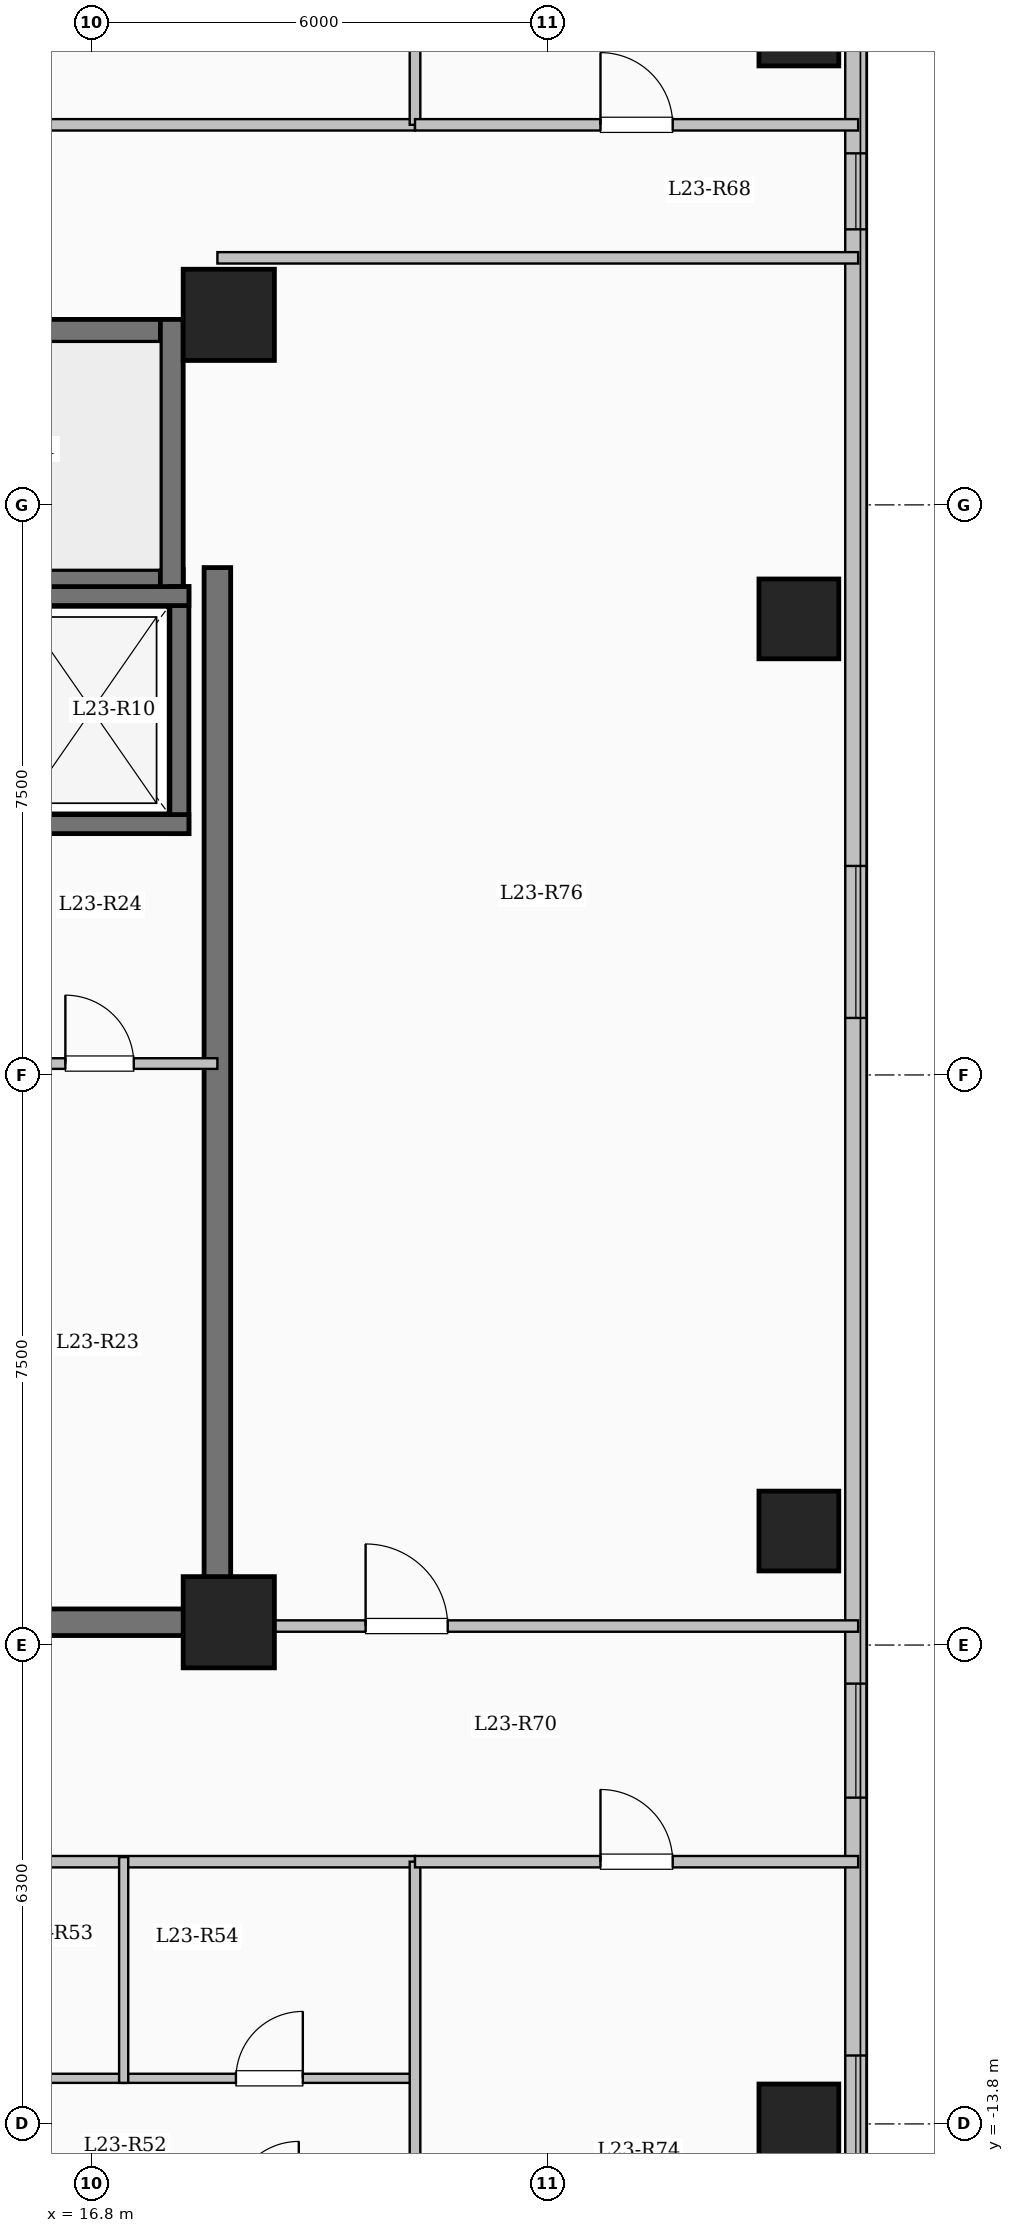
"""IFC4 building model, lengths in metres.
Left out: names, types, materials, properties, quantities, classifications, styles, units other than length and angle.
Written with IfcOpenShell. Run it as: python <this file> out.ifc"""

import sys

from ifc_helpers import new_model, si_unit, direction, frame, frame_2d, origin, origin_2d, place, context, subcontext, project, spatial, rectangle, extrude, element, fill, save


model = new_model("IFC4")
c1 = context("Model", 3, precision=1e-05, world=origin(), true_north=direction((0.0, 1.0)))
c2 = subcontext(c1, "Body", "Model", "MODEL_VIEW")
j1 = project(units=[si_unit("LENGTHUNIT", "METRE"), si_unit("PLANEANGLEUNIT", "RADIAN")], contexts=[c1])
p1 = place(None, origin())
s1 = spatial("IfcSite", under=j1, at=p1, CompositionType="ELEMENT")
p2 = place(p1, origin())
s2 = spatial("IfcBuilding", under=s1, at=p2, CompositionType="ELEMENT")
p3 = place(p2, frame((0.0, 0.0, 88.35)))
s3 = spatial("IfcBuildingStorey", under=s2, at=p3, CompositionType="ELEMENT", Elevation=88.35)
for number, where, z_axis, x_axis in (
    (1, (18.6, -7.2, 0.0), (0.0, 0.0, 1.0), (1.0, 0.0, 0.0)),
    (2, (18.6, 10.0, 0.0), (0.0, 0.0, 1.0), (1.0, 0.0, 0.0)),
):
    element("IfcColumn", number, at=place(p3, frame(where, z_axis=z_axis, x_axis=x_axis)), inside=s3, PredefinedType="COLUMN", context=c2, shape_type="SweptSolid", body=[
        extrude(rectangle(XDim=1.2, YDim=1.2, at=origin_2d()), origin(), (0.0, 0.0, 1.0), 3.35),
    ])
for number, where, z_axis, x_axis in (
    (3, (26.1, -13.8, 0.0), (0.0, 0.0, 1.0), (1.0, 0.0, 0.0)),
    (4, (26.1, -6.0, 0.0), (0.0, 0.0, 1.0), (1.0, 0.0, 0.0)),
    (5, (26.1, 6.0, 0.0), (0.0, 0.0, 1.0), (1.0, 0.0, 0.0)),
    (6, (26.1, 13.8, 0.0), (0.0, 0.0, 1.0), (1.0, 0.0, 0.0)),
):
    element("IfcColumn", number, at=place(p3, frame(where, z_axis=z_axis, x_axis=x_axis)), inside=s3, PredefinedType="COLUMN", context=c2, shape_type="SweptSolid", body=[
        extrude(rectangle(XDim=1.05, YDim=1.05, at=origin_2d()), origin(), (0.0, 0.0, 1.0), 3.35),
    ])
p4 = place(p3, frame((26.85, 17.85, 0.0), z_axis=(0.0, 0.0, 1.0), x_axis=(0.0, -1.0, 0.0)))
e7 = element("IfcWall", 7, at=p4, inside=s3, PredefinedType="SOLIDWALL", context=c2, shape_type="SweptSolid", body=[
    extrude(rectangle(XDim=35.7, YDim=0.28, at=frame_2d((17.85, 0.0))), origin(), (0.0, 0.0, 1.0), 3.1),
])
p5 = place(p4, frame((1.675, 0.0, 0.9)))
e8 = element("IfcOpeningElement", 8, at=p5, cuts=e7, PredefinedType="OPENING", context=c2, shape_type="SweptSolid", body=[
    extrude(rectangle(XDim=2.0, YDim=1.7, at=frame_2d((1.0, 0.85))), frame((0.0, 0.15, 0.0), z_axis=(0.0, -1.0, 0.0), x_axis=(1.0, 0.0, 0.0)), (0.0, 0.0, 1.0), 0.3),
])
p6 = place(p4, frame((5.725, 0.0, 0.95)))
e9 = element("IfcOpeningElement", 9, at=p6, cuts=e7, PredefinedType="OPENING", context=c2, shape_type="SweptSolid", body=[
    extrude(rectangle(XDim=1.0, YDim=1.5, at=frame_2d((0.5, 0.75))), frame((0.0, 0.15, 0.0), z_axis=(0.0, -1.0, 0.0), x_axis=(1.0, 0.0, 0.0)), (0.0, 0.0, 1.0), 0.3),
])
p7 = place(p4, frame((15.1, 0.0, 0.9)))
e10 = element("IfcOpeningElement", 10, at=p7, cuts=e7, PredefinedType="OPENING", context=c2, shape_type="SweptSolid", body=[
    extrude(rectangle(XDim=2.0, YDim=1.7, at=frame_2d((1.0, 0.85))), frame((0.0, 0.15, 0.0), z_axis=(0.0, -1.0, 0.0), x_axis=(1.0, 0.0, 0.0)), (0.0, 0.0, 1.0), 0.3),
])
p8 = place(p4, frame((25.857, 0.0, 0.9)))
e11 = element("IfcOpeningElement", 11, at=p8, cuts=e7, PredefinedType="OPENING", context=c2, shape_type="SweptSolid", body=[
    extrude(rectangle(XDim=1.5, YDim=1.65, at=frame_2d((0.75, 0.825))), frame((0.0, 0.15, 0.0), z_axis=(0.0, -1.0, 0.0), x_axis=(1.0, 0.0, 0.0)), (0.0, 0.0, 1.0), 0.3),
])
p9 = place(p4, frame((30.75, 0.0, 0.9)))
e12 = element("IfcOpeningElement", 12, at=p9, cuts=e7, PredefinedType="OPENING", context=c2, shape_type="SweptSolid", body=[
    extrude(rectangle(XDim=2.4, YDim=1.8, at=frame_2d((1.2, 0.9))), frame((0.0, 0.15, 0.0), z_axis=(0.0, -1.0, 0.0), x_axis=(1.0, 0.0, 0.0)), (0.0, 0.0, 1.0), 0.3),
])
p10 = place(p3, frame((10.0, 9.79, 0.0), z_axis=(0.0, 0.0, 1.0), x_axis=(1.0, 0.0, 0.0)))
e13 = element("IfcWall", 13, at=p10, inside=s3, PredefinedType="SHEAR", context=c2, shape_type="SweptSolid", body=[
    extrude(rectangle(XDim=8.0, YDim=0.3, at=frame_2d((4.0, 0.0))), origin(), (0.0, 0.0, 1.0), 3.35),
])
p11 = place(p3, frame((10.0, 6.5, 0.0), z_axis=(0.0, 0.0, 1.0), x_axis=(1.0, 0.0, 0.0)))
e14 = element("IfcWall", 14, at=p11, inside=s3, PredefinedType="SHEAR", context=c2, shape_type="SweptSolid", body=[
    extrude(rectangle(XDim=8.0, YDim=0.3, at=frame_2d((4.0, 0.0))), origin(), (0.0, 0.0, 1.0), 3.35),
])
p12 = place(p11, frame((0.55, 0.0, 0.0)))
e15 = element("IfcOpeningElement", 15, at=p12, cuts=e14, PredefinedType="OPENING", context=c2, shape_type="SweptSolid", body=[
    extrude(rectangle(XDim=1.0, YDim=2.15, at=frame_2d((0.5, 1.075))), frame((0.0, 0.16, 0.0), z_axis=(0.0, -1.0, 0.0), x_axis=(1.0, 0.0, 0.0)), (0.0, 0.0, 1.0), 0.32),
])
p13 = place(p3, frame((17.85, 6.35, 0.0), z_axis=(0.0, 0.0, 1.0), x_axis=(0.0, 1.0, 0.0)))
e16 = element("IfcWall", 16, at=p13, inside=s3, PredefinedType="SHEAR", context=c2, shape_type="SweptSolid", body=[
    extrude(rectangle(XDim=3.59, YDim=0.3, at=frame_2d((1.795, 0.0))), origin(), (0.0, 0.0, 1.0), 3.35),
])
p14 = place(p3, frame((17.95, 3.175, 0.0), z_axis=(0.0, 0.0, 1.0), x_axis=(0.0, 1.0, 0.0)))
e17 = element("IfcWall", 17, at=p14, inside=s3, PredefinedType="SHEAR", context=c2, shape_type="SweptSolid", body=[
    extrude(rectangle(XDim=3.25, YDim=0.25, at=frame_2d((1.625, 0.0))), origin(), (0.0, 0.0, 1.0), 3.35),
])
for number, where, z_axis, x_axis in (
    (18, (15.525, 3.3, 0.0), (0.0, 0.0, 1.0), (1.0, 0.0, 0.0)),
    (19, (15.525, 6.3, 0.0), (0.0, 0.0, 1.0), (1.0, 0.0, 0.0)),
):
    element("IfcWall", number, at=place(p3, frame(where, z_axis=z_axis, x_axis=x_axis)), inside=s3, PredefinedType="SHEAR", context=c2, shape_type="SweptSolid", body=[
        extrude(rectangle(XDim=2.55, YDim=0.25, at=frame_2d((1.275, 0.0))), origin(), (0.0, 0.0, 1.0), 3.35),
    ])
p15 = place(p3, frame((18.45, -7.375, 0.0), z_axis=(0.0, 0.0, 1.0), x_axis=(0.0, 1.0, 0.0)))
e20 = element("IfcWall", 20, at=p15, inside=s3, PredefinedType="SHEAR", context=c2, shape_type="SweptSolid", body=[
    extrude(rectangle(XDim=14.05, YDim=0.35, at=frame_2d((7.025, 0.0))), origin(), (0.0, 0.0, 1.0), 3.35),
])
p16 = place(p3, frame((10.075, -7.2, 0.0), z_axis=(0.0, 0.0, 1.0), x_axis=(1.0, 0.0, 0.0)))
e21 = element("IfcWall", 21, at=p16, inside=s3, PredefinedType="SHEAR", context=c2, shape_type="SweptSolid", body=[
    extrude(rectangle(XDim=8.55, YDim=0.35, at=frame_2d((4.275, 0.0))), origin(), (0.0, 0.0, 1.0), 3.35),
])
p17 = place(p3, frame((15.4, 0.15, 0.0), z_axis=(0.0, 0.0, 1.0), x_axis=(1.0, 0.0, 0.0)))
e22 = element("IfcWall", 22, at=p17, inside=s3, PredefinedType="PARTITIONING", context=c2, shape_type="SweptSolid", body=[
    extrude(rectangle(XDim=3.05, YDim=0.14, at=frame_2d((1.525, 0.0))), origin(), (0.0, 0.0, 1.0), 3.1),
])
p18 = place(p17, frame((1.05, 0.0, 0.0)))
e23 = element("IfcOpeningElement", 23, at=p18, cuts=e22, PredefinedType="OPENING", context=c2, shape_type="SweptSolid", body=[
    extrude(rectangle(XDim=0.9, YDim=2.08, at=frame_2d((0.45, 1.04))), frame((0.0, 0.08, 0.0), z_axis=(0.0, -1.0, 0.0), x_axis=(1.0, 0.0, 0.0)), (0.0, 0.0, 1.0), 0.16),
])
p19 = place(p3, frame((3.85, 12.5, 0.0), z_axis=(0.0, 0.0, 1.0), x_axis=(1.0, 0.0, 0.0)))
e24 = element("IfcWall", 24, at=p19, inside=s3, PredefinedType="PARTITIONING", context=c2, shape_type="SweptSolid", body=[
    extrude(rectangle(XDim=17.2, YDim=0.15, at=frame_2d((8.6, 0.0))), origin(), (0.0, 0.0, 1.0), 3.1),
])
p20 = place(p19, frame((0.7, 0.0, 0.0)))
e25 = element("IfcOpeningElement", 25, at=p20, cuts=e24, PredefinedType="OPENING", context=c2, shape_type="SweptSolid", body=[
    extrude(rectangle(XDim=0.96, YDim=2.15, at=frame_2d((0.48, 1.075))), frame((0.0, 0.085, 0.0), z_axis=(0.0, -1.0, 0.0), x_axis=(1.0, 0.0, 0.0)), (0.0, 0.0, 1.0), 0.17),
])
p21 = place(p3, frame((8.55, -10.35, 0.0), z_axis=(0.0, 0.0, 1.0), x_axis=(1.0, 0.0, 0.0)))
e26 = element("IfcWall", 26, at=p21, inside=s3, PredefinedType="PARTITIONING", context=c2, shape_type="SweptSolid", body=[
    extrude(rectangle(XDim=12.5, YDim=0.15, at=frame_2d((6.25, 0.0))), origin(), (0.0, 0.0, 1.0), 3.1),
])
p22 = place(p21, frame((0.75, 0.0, 0.0)))
e27 = element("IfcOpeningElement", 27, at=p22, cuts=e26, PredefinedType="OPENING", context=c2, shape_type="SweptSolid", body=[
    extrude(rectangle(XDim=0.96, YDim=2.15, at=frame_2d((0.48, 1.075))), frame((0.0, 0.085, 0.0), z_axis=(0.0, -1.0, 0.0), x_axis=(1.0, 0.0, 0.0)), (0.0, 0.0, 1.0), 0.17),
])
p23 = place(p3, frame((13.592, -13.2, 0.0), z_axis=(0.0, 0.0, 1.0), x_axis=(1.0, 0.0, 0.0)))
e28 = element("IfcWall", 28, at=p23, inside=s3, PredefinedType="PARTITIONING", context=c2, shape_type="SweptSolid", body=[
    extrude(rectangle(XDim=3.625, YDim=0.12, at=frame_2d((1.812, 0.0))), origin(), (0.0, 0.0, 1.0), 3.1),
])
p24 = place(p23, frame((1.372, 0.0, 0.0)))
e29 = element("IfcOpeningElement", 29, at=p24, cuts=e28, PredefinedType="OPENING", context=c2, shape_type="SweptSolid", body=[
    extrude(rectangle(XDim=0.88, YDim=2.1, at=frame_2d((0.44, 1.05))), frame((0.0, 0.07, 0.0), z_axis=(0.0, -1.0, 0.0), x_axis=(1.0, 0.0, 0.0)), (0.0, 0.0, 1.0), 0.14),
])
p25 = place(p3, frame((17.217, -13.2, 0.0), z_axis=(0.0, 0.0, 1.0), x_axis=(1.0, 0.0, 0.0)))
e30 = element("IfcWall", 30, at=p25, inside=s3, PredefinedType="PARTITIONING", context=c2, shape_type="SweptSolid", body=[
    extrude(rectangle(XDim=3.833, YDim=0.12, at=frame_2d((1.917, 0.0))), origin(), (0.0, 0.0, 1.0), 3.1),
])
p26 = place(p25, frame((1.477, 0.0, 0.0)))
e31 = element("IfcOpeningElement", 31, at=p26, cuts=e30, PredefinedType="OPENING", context=c2, shape_type="SweptSolid", body=[
    extrude(rectangle(XDim=0.88, YDim=2.1, at=frame_2d((0.44, 1.05))), frame((0.0, 0.07, 0.0), z_axis=(0.0, -1.0, 0.0), x_axis=(1.0, 0.0, 0.0)), (0.0, 0.0, 1.0), 0.14),
])
p27 = place(p3, frame((17.217, -13.26, 0.0), z_axis=(0.0, 0.0, 1.0), x_axis=(0.0, 1.0, 0.0)))
e32 = element("IfcWall", 32, at=p27, inside=s3, PredefinedType="PARTITIONING", context=c2, shape_type="SweptSolid", body=[
    extrude(rectangle(XDim=2.97, YDim=0.12, at=frame_2d((1.485, 0.0))), origin(), (0.0, 0.0, 1.0), 3.1),
])
p28 = place(p3, frame((18.45, -7.25, 0.0), z_axis=(0.0, 0.0, 1.0), x_axis=(1.0, 0.0, 0.0)))
e33 = element("IfcWall", 33, at=p28, inside=s3, PredefinedType="PARTITIONING", context=c2, shape_type="SweptSolid", body=[
    extrude(rectangle(XDim=8.43, YDim=0.15, at=frame_2d((4.215, 0.0))), origin(), (0.0, 0.0, 1.0), 3.1),
])
p29 = place(p28, frame((1.95, 0.0, 0.0)))
e34 = element("IfcOpeningElement", 34, at=p29, cuts=e33, PredefinedType="OPENING", context=c2, shape_type="SweptSolid", body=[
    extrude(rectangle(XDim=1.08, YDim=2.15, at=frame_2d((0.54, 1.075))), frame((0.0, 0.085, 0.0), z_axis=(0.0, -1.0, 0.0), x_axis=(1.0, 0.0, 0.0)), (0.0, 0.0, 1.0), 0.17),
])
p30 = place(p3, frame((18.45, 10.75, 0.0), z_axis=(0.0, 0.0, 1.0), x_axis=(1.0, 0.0, 0.0)))
e35 = element("IfcWall", 35, at=p30, inside=s3, PredefinedType="PARTITIONING", context=c2, shape_type="SweptSolid", body=[
    extrude(rectangle(XDim=8.43, YDim=0.15, at=frame_2d((4.215, 0.0))), origin(), (0.0, 0.0, 1.0), 3.1),
])
p31 = place(p3, frame((21.05, -17.85, 0.0), z_axis=(0.0, 0.0, 1.0), x_axis=(0.0, 1.0, 0.0)))
e36 = element("IfcWall", 36, at=p31, inside=s3, PredefinedType="PARTITIONING", context=c2, shape_type="SweptSolid", body=[
    extrude(rectangle(XDim=7.5, YDim=0.14, at=frame_2d((3.75, 0.0))), origin(), (0.0, 0.0, 1.0), 3.1),
])
p32 = place(p3, frame((21.05, 12.5, 0.0), z_axis=(0.0, 0.0, 1.0), x_axis=(0.0, 1.0, 0.0)))
e37 = element("IfcWall", 37, at=p32, inside=s3, PredefinedType="PARTITIONING", context=c2, shape_type="SweptSolid", body=[
    extrude(rectangle(XDim=5.35, YDim=0.14, at=frame_2d((2.675, 0.0))), origin(), (0.0, 0.0, 1.0), 3.1),
])
p33 = place(p3, frame((21.05, 12.5, 0.0), z_axis=(0.0, 0.0, 1.0), x_axis=(1.0, 0.0, 0.0)))
e38 = element("IfcWall", 38, at=p33, inside=s3, PredefinedType="PARTITIONING", context=c2, shape_type="SweptSolid", body=[
    extrude(rectangle(XDim=5.83, YDim=0.15, at=frame_2d((2.915, 0.0))), origin(), (0.0, 0.0, 1.0), 3.1),
])
p34 = place(p33, frame((2.44, 0.0, 0.0)))
e39 = element("IfcOpeningElement", 39, at=p34, cuts=e38, PredefinedType="OPENING", context=c2, shape_type="SweptSolid", body=[
    extrude(rectangle(XDim=0.95, YDim=2.15, at=frame_2d((0.475, 1.075))), frame((0.0, 0.085, 0.0), z_axis=(0.0, -1.0, 0.0), x_axis=(1.0, 0.0, 0.0)), (0.0, 0.0, 1.0), 0.17),
])
p35 = place(p3, frame((21.05, -10.35, 0.0), z_axis=(0.0, 0.0, 1.0), x_axis=(1.0, 0.0, 0.0)))
e40 = element("IfcWall", 40, at=p35, inside=s3, PredefinedType="PARTITIONING", context=c2, shape_type="SweptSolid", body=[
    extrude(rectangle(XDim=5.83, YDim=0.15, at=frame_2d((2.915, 0.0))), origin(), (0.0, 0.0, 1.0), 3.1),
])
p36 = place(p35, frame((2.44, 0.0, 0.0)))
e41 = element("IfcOpeningElement", 41, at=p36, cuts=e40, PredefinedType="OPENING", context=c2, shape_type="SweptSolid", body=[
    extrude(rectangle(XDim=0.95, YDim=2.15, at=frame_2d((0.475, 1.075))), frame((0.0, 0.085, 0.0), z_axis=(0.0, -1.0, 0.0), x_axis=(1.0, 0.0, 0.0)), (0.0, 0.0, 1.0), 0.17),
])
p37 = place(p6, origin())
e42 = element("IfcWindow", 42, at=p37, inside=s3, PartitioningType="SINGLE_PANEL", PredefinedType="WINDOW", context=c2, shape_type="SweptSolid", body=[
    extrude(rectangle(XDim=1.0, YDim=1.5, at=frame_2d((0.5, 0.75))), frame((0.0, 0.03, 0.0), z_axis=(0.0, -1.0, 0.0), x_axis=(1.0, 0.0, 0.0)), (0.0, 0.0, 1.0), 0.06),
])
fill(e9, e42)
p38 = place(p7, origin())
e43 = element("IfcWindow", 43, at=p38, inside=s3, PartitioningType="SINGLE_PANEL", PredefinedType="WINDOW", context=c2, shape_type="SweptSolid", body=[
    extrude(rectangle(XDim=2.0, YDim=1.7, at=frame_2d((1.0, 0.85))), frame((0.0, 0.03, 0.0), z_axis=(0.0, -1.0, 0.0), x_axis=(1.0, 0.0, 0.0)), (0.0, 0.0, 1.0), 0.06),
])
fill(e10, e43)
p39 = place(p8, origin())
e44 = element("IfcWindow", 44, at=p39, inside=s3, PartitioningType="SINGLE_PANEL", PredefinedType="WINDOW", context=c2, shape_type="SweptSolid", body=[
    extrude(rectangle(XDim=1.5, YDim=1.65, at=frame_2d((0.75, 0.825))), frame((0.0, 0.03, 0.0), z_axis=(0.0, -1.0, 0.0), x_axis=(1.0, 0.0, 0.0)), (0.0, 0.0, 1.0), 0.06),
])
fill(e11, e44)
p40 = place(p9, origin())
e45 = element("IfcWindow", 45, at=p40, inside=s3, PartitioningType="SINGLE_PANEL", PredefinedType="WINDOW", context=c2, shape_type="SweptSolid", body=[
    extrude(rectangle(XDim=2.4, YDim=1.8, at=frame_2d((1.2, 0.9))), frame((0.0, 0.03, 0.0), z_axis=(0.0, -1.0, 0.0), x_axis=(1.0, 0.0, 0.0)), (0.0, 0.0, 1.0), 0.06),
])
fill(e12, e45)
p41 = place(p18, origin())
e46 = element("IfcDoor", 46, at=p41, inside=s3, OperationType="SINGLE_SWING_LEFT", PredefinedType="DOOR", context=c2, shape_type="SweptSolid", body=[
    extrude(rectangle(XDim=0.9, YDim=2.08, at=frame_2d((0.45, 1.04))), frame((0.0, 0.025, 0.0), z_axis=(0.0, -1.0, 0.0), x_axis=(1.0, 0.0, 0.0)), (0.0, 0.0, 1.0), 0.05),
])
fill(e23, e46)
p42 = place(p26, origin())
e47 = element("IfcDoor", 47, at=p42, inside=s3, OperationType="SINGLE_SWING_RIGHT", PredefinedType="DOOR", context=c2, shape_type="SweptSolid", body=[
    extrude(rectangle(XDim=0.88, YDim=2.1, at=frame_2d((0.44, 1.05))), frame((0.0, 0.025, 0.0), z_axis=(0.0, -1.0, 0.0), x_axis=(1.0, 0.0, 0.0)), (0.0, 0.0, 1.0), 0.05),
])
fill(e31, e47)
p43 = place(p34, origin())
e48 = element("IfcDoor", 48, at=p43, inside=s3, OperationType="SINGLE_SWING_LEFT", PredefinedType="DOOR", context=c2, shape_type="SweptSolid", body=[
    extrude(rectangle(XDim=0.95, YDim=2.15, at=frame_2d((0.475, 1.075))), frame((0.0, 0.025, 0.0), z_axis=(0.0, -1.0, 0.0), x_axis=(1.0, 0.0, 0.0)), (0.0, 0.0, 1.0), 0.05),
])
fill(e39, e48)
p44 = place(p36, origin())
e49 = element("IfcDoor", 49, at=p44, inside=s3, OperationType="SINGLE_SWING_LEFT", PredefinedType="DOOR", context=c2, shape_type="SweptSolid", body=[
    extrude(rectangle(XDim=0.95, YDim=2.15, at=frame_2d((0.475, 1.075))), frame((0.0, 0.025, 0.0), z_axis=(0.0, -1.0, 0.0), x_axis=(1.0, 0.0, 0.0)), (0.0, 0.0, 1.0), 0.05),
])
fill(e41, e49)
p45 = place(p29, origin())
e50 = element("IfcDoor", 50, at=p45, inside=s3, OperationType="SINGLE_SWING_LEFT", PredefinedType="DOOR", context=c2, shape_type="SweptSolid", body=[
    extrude(rectangle(XDim=1.08, YDim=2.15, at=frame_2d((0.54, 1.075))), frame((0.0, 0.025, 0.0), z_axis=(0.0, -1.0, 0.0), x_axis=(1.0, 0.0, 0.0)), (0.0, 0.0, 1.0), 0.05),
])
fill(e34, e50)
save(model, sys.argv[1])
